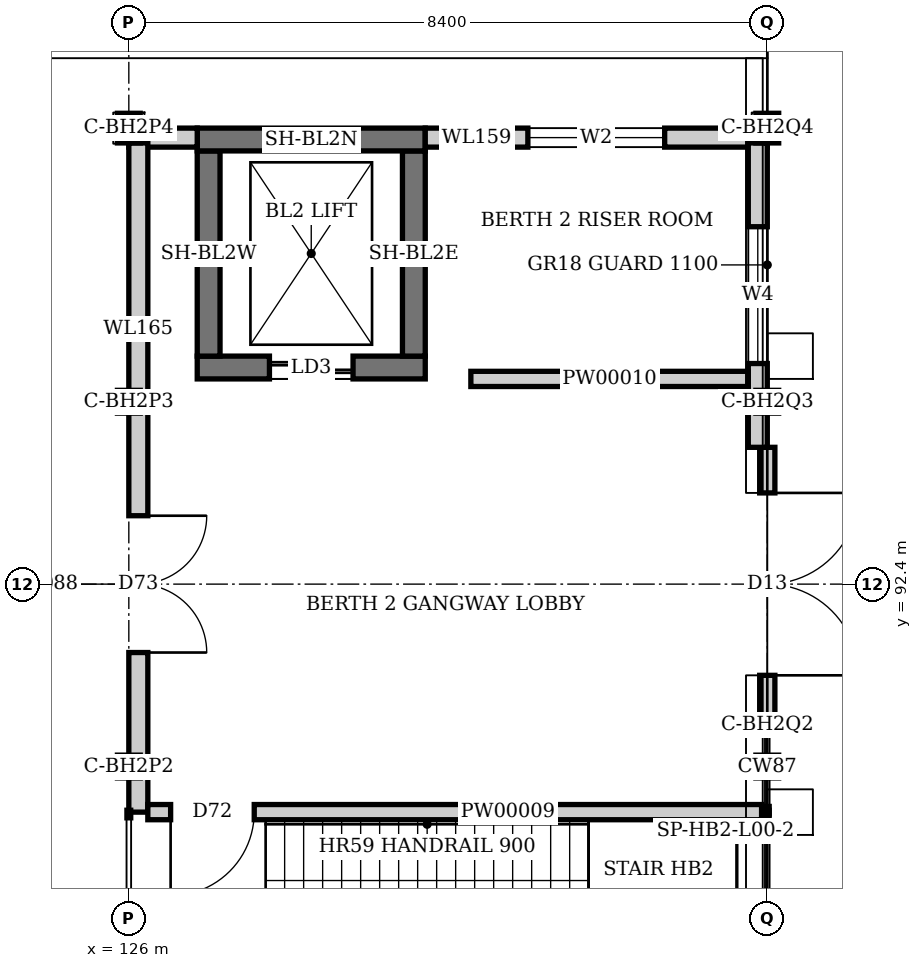
"""IFC4 building model, lengths in metres.
Left out: names, types, materials, properties, quantities, classifications, styles, units other than length and angle.
Written with IfcOpenShell. Run it as: python <this file> out.ifc"""

import sys

from ifc_helpers import new_model, si_unit, direction, frame, frame_2d, origin, origin_2d, place, context, subcontext, project, spatial, rectangle, hollow_circle, i_section, extrude, element, fill, save


model = new_model("IFC4")
c1 = context("Model", 3, precision=1e-05, world=origin(), true_north=direction((0.0, 1.0)))
c2 = subcontext(c1, "Body", "Model", "MODEL_VIEW")
j1 = project(units=[si_unit("LENGTHUNIT", "METRE"), si_unit("PLANEANGLEUNIT", "RADIAN")], contexts=[c1])
p1 = place(None, origin())
s1 = spatial("IfcSite", under=j1, at=p1, CompositionType="ELEMENT")
p2 = place(p1, origin())
s2 = spatial("IfcBuilding", under=s1, at=p2, CompositionType="ELEMENT")
p3 = place(p2, origin())
s3 = spatial("IfcBuildingStorey", under=s2, at=p3, CompositionType="ELEMENT", Elevation=0.0)
p4 = place(p3, frame((126.9, 95.25, -0.3), z_axis=(0.0, 0.0, 1.0), x_axis=(1.0, 0.0, 0.0)))
e1 = element("IfcWall", 1, at=p4, inside=s3, PredefinedType="SHEAR", context=c2, shape_type="SweptSolid", body=[
    extrude(rectangle(XDim=3.0, YDim=0.3, at=frame_2d((1.5, 0.0))), origin(), (0.0, 0.0, 1.0), 6.3),
])
p5 = place(p4, frame((0.95, 0.0, 0.3)))
e2 = element("IfcOpeningElement", 2, at=p5, cuts=e1, PredefinedType="OPENING", context=c2, shape_type="SweptSolid", body=[
    extrude(rectangle(XDim=1.1, YDim=2.1, at=frame_2d((0.55, 1.05))), frame((0.0, 0.16, 0.0), z_axis=(0.0, -1.0, 0.0), x_axis=(1.0, 0.0, 0.0)), (0.0, 0.0, 1.0), 0.32),
])
for number, where, z_axis, x_axis in (
    (3, (129.75, 95.4, -0.3), (0.0, 0.0, 1.0), (0.0, 1.0, 0.0)),
    (4, (127.05, 95.4, -0.3), (0.0, 0.0, 1.0), (0.0, 1.0, 0.0)),
):
    element("IfcWall", number, at=place(p3, frame(where, z_axis=z_axis, x_axis=x_axis)), inside=s3, PredefinedType="SHEAR", context=c2, shape_type="SweptSolid", body=[
        extrude(rectangle(XDim=2.7, YDim=0.3, at=frame_2d((1.35, 0.0))), origin(), (0.0, 0.0, 1.0), 6.3),
    ])
p6 = place(p3, frame((126.9, 98.25, -0.3), z_axis=(0.0, 0.0, 1.0), x_axis=(1.0, 0.0, 0.0)))
e5 = element("IfcWall", 5, at=p6, inside=s3, PredefinedType="SHEAR", context=c2, shape_type="SweptSolid", body=[
    extrude(rectangle(XDim=3.0, YDim=0.3, at=frame_2d((1.5, 0.0))), origin(), (0.0, 0.0, 1.0), 6.3),
])
for number, where, z_axis, x_axis in (
    (6, (126.0, 90.0, -0.6), (0.0, 0.0, 1.0), (1.0, 0.0, 0.0)),
    (7, (126.0, 94.8, -0.6), (0.0, 0.0, 1.0), (1.0, 0.0, 0.0)),
):
    element("IfcColumn", number, at=place(p3, frame(where, z_axis=z_axis, x_axis=x_axis)), inside=s3, PredefinedType="COLUMN", context=c2, shape_type="SweptSolid", body=[
        extrude(i_section(OverallWidth=0.3, OverallDepth=0.3, WebThickness=0.011, FlangeThickness=0.019, at=origin_2d()), origin(), (0.0, 0.0, 1.0), 6.6),
    ])
p7 = place(p3, frame((126.0, 98.4, -0.6), z_axis=(0.0, 0.0, 1.0), x_axis=(1.0, 0.0, 0.0)))
e8 = element("IfcColumn", 8, at=p7, inside=s3, PredefinedType="COLUMN", context=c2, shape_type="SweptSolid", body=[
    extrude(i_section(OverallWidth=0.3, OverallDepth=0.39, WebThickness=0.011, FlangeThickness=0.019, at=origin_2d()), origin(), (0.0, 0.0, 1.0), 6.6),
])
for number, where, z_axis, x_axis in (
    (9, (134.4, 90.0, -0.6), (0.0, 0.0, 1.0), (1.0, 0.0, 0.0)),
    (10, (134.4, 94.8, -0.6), (0.0, 0.0, 1.0), (1.0, 0.0, 0.0)),
):
    element("IfcColumn", number, at=place(p3, frame(where, z_axis=z_axis, x_axis=x_axis)), inside=s3, PredefinedType="COLUMN", context=c2, shape_type="SweptSolid", body=[
        extrude(i_section(OverallWidth=0.3, OverallDepth=0.3, WebThickness=0.011, FlangeThickness=0.019, at=origin_2d()), origin(), (0.0, 0.0, 1.0), 6.6),
    ])
p8 = place(p3, frame((134.4, 98.4, -0.6), z_axis=(0.0, 0.0, 1.0), x_axis=(1.0, 0.0, 0.0)))
e11 = element("IfcColumn", 11, at=p8, inside=s3, PredefinedType="COLUMN", context=c2, shape_type="SweptSolid", body=[
    extrude(i_section(OverallWidth=0.3, OverallDepth=0.39, WebThickness=0.011, FlangeThickness=0.019, at=origin_2d()), origin(), (0.0, 0.0, 1.0), 6.6),
])
p9 = place(p3, frame((134.4, 90.555, 0.0), z_axis=(0.0, 0.0, 1.0), x_axis=(0.0, 1.0, 0.0)))
e12 = element("IfcWall", 12, at=p9, inside=s3, PredefinedType="SOLIDWALL", context=c2, shape_type="SweptSolid", body=[
    extrude(rectangle(XDim=3.645, YDim=0.2, at=frame_2d((1.823, 0.0))), origin(), (0.0, 0.0, 1.0), 5.346),
])
p10 = place(p9, frame((0.645, 0.0, 0.0)))
e13 = element("IfcOpeningElement", 13, at=p10, cuts=e12, PredefinedType="OPENING", context=c2, shape_type="SweptSolid", body=[
    extrude(rectangle(XDim=2.4, YDim=2.4, at=frame_2d((1.2, 1.2))), frame((0.0, 0.11, 0.0), z_axis=(0.0, -1.0, 0.0), x_axis=(1.0, 0.0, 0.0)), (0.0, 0.0, 1.0), 0.22),
])
p11 = place(p3, frame((126.0, 98.275, 0.0), z_axis=(0.0, 0.0, 1.0), x_axis=(1.0, 0.0, 0.0)))
e14 = element("IfcWall", 14, at=p11, inside=s3, PredefinedType="SOLIDWALL", context=c2, shape_type="SweptSolid", body=[
    extrude(rectangle(XDim=0.9, YDim=0.25, at=frame_2d((0.45, 0.0))), origin(), (0.0, 0.0, 1.0), 5.8),
])
p12 = place(p3, frame((129.9, 98.275, 0.0), z_axis=(0.0, 0.0, 1.0), x_axis=(1.0, 0.0, 0.0)))
e15 = element("IfcWall", 15, at=p12, inside=s3, PredefinedType="SOLIDWALL", context=c2, shape_type="SweptSolid", body=[
    extrude(rectangle(XDim=4.5, YDim=0.25, at=frame_2d((2.25, 0.0))), origin(), (0.0, 0.0, 1.0), 5.8),
])
p13 = place(p12, frame((1.35, 0.0, 0.9)))
e16 = element("IfcOpeningElement", 16, at=p13, cuts=e15, PredefinedType="OPENING", context=c2, shape_type="SweptSolid", body=[
    extrude(rectangle(XDim=1.8, YDim=1.8, at=frame_2d((0.9, 0.9))), frame((0.0, 0.135, 0.0), z_axis=(0.0, -1.0, 0.0), x_axis=(1.0, 0.0, 0.0)), (0.0, 0.0, 1.0), 0.27),
])
p14 = place(p3, frame((126.125, 89.4, 0.0), z_axis=(0.0, 0.0, 1.0), x_axis=(0.0, 1.0, 0.0)))
e17 = element("IfcWall", 17, at=p14, inside=s3, PredefinedType="SOLIDWALL", context=c2, shape_type="SweptSolid", body=[
    extrude(rectangle(XDim=8.805, YDim=0.25, at=frame_2d((4.403, 0.0))), origin(), (0.0, 0.0, 1.0), 5.8),
])
p15 = place(p14, frame((2.1, 0.0, 0.0)))
e18 = element("IfcOpeningElement", 18, at=p15, cuts=e17, PredefinedType="OPENING", context=c2, shape_type="SweptSolid", body=[
    extrude(rectangle(XDim=1.8, YDim=2.0, at=frame_2d((0.9, 1.0))), frame((0.0, 0.135, 0.0), z_axis=(0.0, -1.0, 0.0), x_axis=(1.0, 0.0, 0.0)), (0.0, 0.0, 1.0), 0.27),
])
p16 = place(p3, frame((134.275, 94.2, 0.0), z_axis=(0.0, 0.0, 1.0), x_axis=(0.0, 1.0, 0.0)))
e19 = element("IfcWall", 19, at=p16, inside=s3, PredefinedType="SOLIDWALL", context=c2, shape_type="SweptSolid", body=[
    extrude(rectangle(XDim=4.005, YDim=0.25, at=frame_2d((2.002, 0.0))), origin(), (0.0, 0.0, 1.0), 5.8),
])
p17 = place(p16, frame((1.103, 0.0, 0.9)))
e20 = element("IfcOpeningElement", 20, at=p17, cuts=e19, PredefinedType="OPENING", context=c2, shape_type="SweptSolid", body=[
    extrude(rectangle(XDim=1.8, YDim=1.8, at=frame_2d((0.9, 0.9))), frame((0.0, 0.135, 0.0), z_axis=(0.0, -1.0, 0.0), x_axis=(1.0, 0.0, 0.0)), (0.0, 0.0, 1.0), 0.27),
])
p18 = place(p3, frame((126.25, 89.4, 0.0), z_axis=(0.0, 0.0, 1.0), x_axis=(1.0, 0.0, 0.0)))
e21 = element("IfcWall", 21, at=p18, inside=s3, PredefinedType="PARTITIONING", context=c2, shape_type="SweptSolid", body=[
    extrude(rectangle(XDim=8.075, YDim=0.2, at=frame_2d((4.038, 0.0))), origin(), (0.0, 0.0, 1.0), 5.8),
])
p19 = place(p18, frame((0.3, 0.0, 0.0)))
e22 = element("IfcOpeningElement", 22, at=p19, cuts=e21, PredefinedType="OPENING", context=c2, shape_type="SweptSolid", body=[
    extrude(rectangle(XDim=1.1, YDim=2.4, at=frame_2d((0.55, 1.2))), frame((0.0, 0.11, 0.0), z_axis=(0.0, -1.0, 0.0), x_axis=(1.0, 0.0, 0.0)), (0.0, 0.0, 1.0), 0.22),
])
p20 = place(p3, frame((130.5, 95.1, 0.0), z_axis=(0.0, 0.0, 1.0), x_axis=(1.0, 0.0, 0.0)))
e23 = element("IfcWall", 23, at=p20, inside=s3, PredefinedType="PARTITIONING", context=c2, shape_type="SweptSolid", body=[
    extrude(rectangle(XDim=3.65, YDim=0.2, at=frame_2d((1.825, 0.0))), origin(), (0.0, 0.0, 1.0), 5.8),
])
p21 = place(p3, frame((133.85, 89.15, 0.0), z_axis=(0.0, 0.0, 1.0), x_axis=(1.0, 0.0, 0.0)))
e24 = element("IfcColumn", 24, at=p21, inside=s3, PredefinedType="COLUMN", context=c2, shape_type="SweptSolid", body=[
    extrude(hollow_circle(Radius=0.07, WallThickness=0.008, at=origin_2d()), origin(), (0.0, 0.0, 1.0), 2.8),
])
p22 = place(p10, frame((2.4, 0.0, 0.0), z_axis=(0.0, 0.0, 1.0), x_axis=(-1.0, 0.0, 0.0)))
e25 = element("IfcDoor", 25, at=p22, inside=s3, OperationType="DOUBLE_DOOR_SINGLE_SWING", PredefinedType="DOOR", context=c2, shape_type="SweptSolid", body=[
    extrude(rectangle(XDim=2.4, YDim=2.4, at=frame_2d((1.2, 1.2))), frame((0.0, 0.025, 0.0), z_axis=(0.0, -1.0, 0.0), x_axis=(1.0, 0.0, 0.0)), (0.0, 0.0, 1.0), 0.05),
])
fill(e13, e25)
p23 = place(p13, origin())
e26 = element("IfcWindow", 26, at=p23, inside=s3, PartitioningType="SINGLE_PANEL", PredefinedType="WINDOW", context=c2, shape_type="SweptSolid", body=[
    extrude(rectangle(XDim=1.8, YDim=1.8, at=frame_2d((0.9, 0.9))), frame((0.0, 0.03, 0.0), z_axis=(0.0, -1.0, 0.0), x_axis=(1.0, 0.0, 0.0)), (0.0, 0.0, 1.0), 0.06),
])
fill(e16, e26)
p24 = place(p17, origin())
e27 = element("IfcWindow", 27, at=p24, inside=s3, PartitioningType="SINGLE_PANEL", PredefinedType="WINDOW", context=c2, shape_type="SweptSolid", body=[
    extrude(rectangle(XDim=1.8, YDim=1.8, at=frame_2d((0.9, 0.9))), frame((0.0, 0.03, 0.0), z_axis=(0.0, -1.0, 0.0), x_axis=(1.0, 0.0, 0.0)), (0.0, 0.0, 1.0), 0.06),
])
fill(e20, e27)
p25 = place(p19, frame((1.1, 0.0, 0.0), z_axis=(0.0, 0.0, 1.0), x_axis=(-1.0, 0.0, 0.0)))
e28 = element("IfcDoor", 28, at=p25, inside=s3, OperationType="SINGLE_SWING_RIGHT", PredefinedType="DOOR", context=c2, shape_type="SweptSolid", body=[
    extrude(rectangle(XDim=1.1, YDim=2.4, at=frame_2d((0.55, 1.2))), frame((0.0, 0.025, 0.0), z_axis=(0.0, -1.0, 0.0), x_axis=(1.0, 0.0, 0.0)), (0.0, 0.0, 1.0), 0.05),
])
fill(e22, e28)
p26 = place(p15, frame((1.8, 0.0, 0.0), z_axis=(0.0, 0.0, 1.0), x_axis=(-1.0, 0.0, 0.0)))
e29 = element("IfcDoor", 29, at=p26, inside=s3, OperationType="DOUBLE_DOOR_SINGLE_SWING", PredefinedType="DOOR", context=c2, shape_type="SweptSolid", body=[
    extrude(rectangle(XDim=1.8, YDim=2.0, at=frame_2d((0.9, 1.0))), frame((0.0, 0.025, 0.0), z_axis=(0.0, -1.0, 0.0), x_axis=(1.0, 0.0, 0.0)), (0.0, 0.0, 1.0), 0.05),
])
fill(e18, e29)
p27 = place(p5, origin())
e30 = element("IfcDoor", 30, at=p27, inside=s3, OperationType="SLIDING_TO_LEFT", PredefinedType="DOOR", context=c2, shape_type="SweptSolid", body=[
    extrude(rectangle(XDim=1.1, YDim=2.1, at=frame_2d((0.55, 1.05))), frame((0.0, 0.025, 0.0), z_axis=(0.0, -1.0, 0.0), x_axis=(1.0, 0.0, 0.0)), (0.0, 0.0, 1.0), 0.05),
])
fill(e2, e30)
save(model, sys.argv[1])
